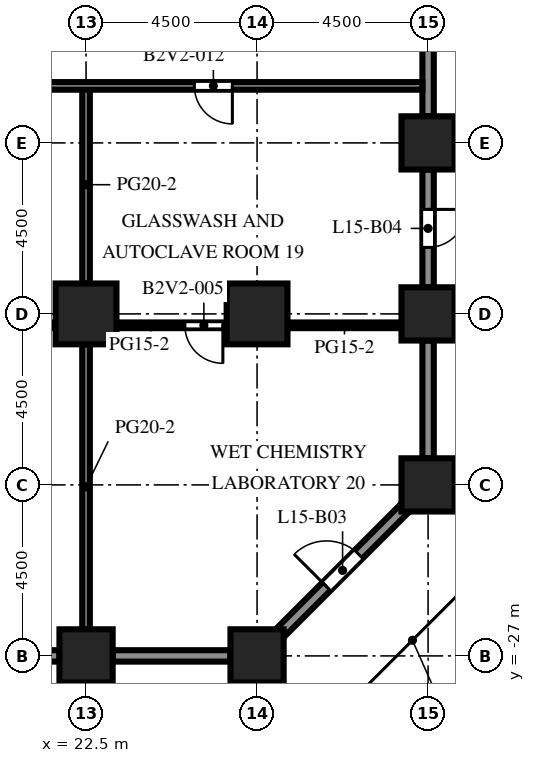
"""IFC4 building model, lengths in metres.
Left out: names, types, materials, properties, quantities, classifications, styles, units other than length and angle.
Written with IfcOpenShell. Run it as: python <this file> out.ifc"""

import sys

from ifc_helpers import new_model, si_unit, direction, frame, frame_2d, origin, origin_2d, place, context, subcontext, project, spatial, rectangle, extrude, element, fill, save


model = new_model("IFC4")
c1 = context("Model", 3, precision=1e-05, world=origin(), true_north=direction((0.0, 1.0)))
c2 = subcontext(c1, "Body", "Model", "MODEL_VIEW")
j1 = project(units=[si_unit("LENGTHUNIT", "METRE"), si_unit("PLANEANGLEUNIT", "RADIAN")], contexts=[c1])
p1 = place(None, origin())
s1 = spatial("IfcSite", under=j1, at=p1, CompositionType="ELEMENT")
p2 = place(p1, origin())
s2 = spatial("IfcBuilding", under=s1, at=p2, CompositionType="ELEMENT")
p3 = place(p2, frame((0.0, 0.0, 66.5)))
s3 = spatial("IfcBuildingStorey", under=s2, at=p3, CompositionType="ELEMENT", Elevation=66.5)
for number, where, z_axis, x_axis in (
    (1, (22.5, -27.0, 0.0), (0.0, 0.0, 1.0), (1.0, 0.0, 0.0)),
    (2, (27.0, -27.0, 0.0), (0.0, 0.0, 1.0), (1.0, 0.0, 0.0)),
    (3, (31.5, -22.5, 0.0), (0.0, 0.0, 1.0), (1.0, 0.0, 0.0)),
    (4, (31.5, -18.0, 0.0), (0.0, 0.0, 1.0), (1.0, 0.0, 0.0)),
    (5, (31.5, -13.5, 0.0), (0.0, 0.0, 1.0), (1.0, 0.0, 0.0)),
):
    element("IfcColumn", number, at=place(p3, frame(where, z_axis=z_axis, x_axis=x_axis)), inside=s3, PredefinedType="COLUMN", context=c2, shape_type="SweptSolid", body=[
        extrude(rectangle(XDim=1.4, YDim=1.4, at=origin_2d()), origin(), (0.0, 0.0, 1.0), 4.1),
    ])
for number, where, z_axis, x_axis in (
    (6, (22.5, -18.0, 0.0), (0.0, 0.0, 1.0), (1.0, 0.0, 0.0)),
    (7, (27.0, -18.0, 0.0), (0.0, 0.0, 1.0), (1.0, 0.0, 0.0)),
):
    element("IfcColumn", number, at=place(p3, frame(where, z_axis=z_axis, x_axis=x_axis)), inside=s3, PredefinedType="COLUMN", context=c2, shape_type="SweptSolid", body=[
        extrude(rectangle(XDim=1.6, YDim=1.6, at=origin_2d()), origin(), (0.0, 0.0, 1.0), 4.1),
    ])
p4 = place(p3, frame((21.8, -27.0, 0.0), z_axis=(0.0, 0.0, 1.0), x_axis=(-1.0, 0.0, 0.0)))
e8 = element("IfcWall", 8, at=p4, inside=s3, PredefinedType="SOLIDWALL", context=c2, shape_type="SweptSolid", body=[
    extrude(rectangle(XDim=3.1, YDim=0.3, at=frame_2d((1.55, 0.0))), origin(), (0.0, 0.0, 1.0), 2.6),
])
p5 = place(p4, frame((1.05, 0.0, 0.0)))
e9 = element("IfcOpeningElement", 9, at=p5, cuts=e8, PredefinedType="OPENING", context=c2, shape_type="SweptSolid", body=[
    extrude(rectangle(XDim=1.0, YDim=2.2, at=frame_2d((0.5, 1.1))), frame((0.0, 0.16, 0.0), z_axis=(0.0, -1.0, 0.0), x_axis=(1.0, 0.0, 0.0)), (0.0, 0.0, 1.0), 0.32),
])
p6 = place(p3, frame((26.3, -27.0, 0.0), z_axis=(0.0, 0.0, 1.0), x_axis=(-1.0, 0.0, 0.0)))
e10 = element("IfcWall", 10, at=p6, inside=s3, PredefinedType="SOLIDWALL", context=c2, shape_type="SweptSolid", body=[
    extrude(rectangle(XDim=3.1, YDim=0.3, at=frame_2d((1.55, 0.0))), origin(), (0.0, 0.0, 1.0), 2.6),
])
p7 = place(p3, frame((30.906, -23.094, 0.0), z_axis=(0.0, 0.0, 1.0), x_axis=(-0.707106781187, -0.707106781187, 0.0)))
e11 = element("IfcWall", 11, at=p7, inside=s3, PredefinedType="SOLIDWALL", context=c2, shape_type="SweptSolid", body=[
    extrude(rectangle(XDim=4.684, YDim=0.3, at=frame_2d((2.342, 0.0))), origin(), (0.0, 0.0, 1.0), 2.6),
])
p8 = place(p7, frame((1.742, 0.0, 0.0)))
e12 = element("IfcOpeningElement", 12, at=p8, cuts=e11, PredefinedType="OPENING", context=c2, shape_type="SweptSolid", body=[
    extrude(rectangle(XDim=1.2, YDim=2.2, at=frame_2d((0.6, 1.1))), frame((0.0, 0.16, 0.0), z_axis=(0.0, -1.0, 0.0), x_axis=(1.0, 0.0, 0.0)), (0.0, 0.0, 1.0), 0.32),
])
p9 = place(p3, frame((31.5, -18.7, 0.0), z_axis=(0.0, 0.0, 1.0), x_axis=(0.0, -1.0, 0.0)))
e13 = element("IfcWall", 13, at=p9, inside=s3, PredefinedType="SOLIDWALL", context=c2, shape_type="SweptSolid", body=[
    extrude(rectangle(XDim=3.1, YDim=0.3, at=frame_2d((1.55, 0.0))), origin(), (0.0, 0.0, 1.0), 2.6),
])
p10 = place(p3, frame((31.5, -14.2, 0.0), z_axis=(0.0, 0.0, 1.0), x_axis=(0.0, -1.0, 0.0)))
e14 = element("IfcWall", 14, at=p10, inside=s3, PredefinedType="SOLIDWALL", context=c2, shape_type="SweptSolid", body=[
    extrude(rectangle(XDim=3.1, YDim=0.3, at=frame_2d((1.55, 0.0))), origin(), (0.0, 0.0, 1.0), 2.6),
])
p11 = place(p10, frame((1.05, 0.0, 0.0)))
e15 = element("IfcOpeningElement", 15, at=p11, cuts=e14, PredefinedType="OPENING", context=c2, shape_type="SweptSolid", body=[
    extrude(rectangle(XDim=1.0, YDim=2.2, at=frame_2d((0.5, 1.1))), frame((0.0, 0.16, 0.0), z_axis=(0.0, -1.0, 0.0), x_axis=(1.0, 0.0, 0.0)), (0.0, 0.0, 1.0), 0.32),
])
p12 = place(p3, frame((31.5, -9.7, 0.0), z_axis=(0.0, 0.0, 1.0), x_axis=(0.0, -1.0, 0.0)))
e16 = element("IfcWall", 16, at=p12, inside=s3, PredefinedType="SOLIDWALL", context=c2, shape_type="SweptSolid", body=[
    extrude(rectangle(XDim=3.1, YDim=0.3, at=frame_2d((1.55, 0.0))), origin(), (0.0, 0.0, 1.0), 2.6),
])
p13 = place(p3, frame((22.5, -26.3, 0.0), z_axis=(0.0, 0.0, 1.0), x_axis=(0.0, 1.0, 0.0)))
e17 = element("IfcWall", 17, at=p13, inside=s3, PredefinedType="PARTITIONING", context=c2, shape_type="SweptSolid", body=[
    extrude(rectangle(XDim=7.5, YDim=0.2, at=frame_2d((3.75, 0.0))), origin(), (0.0, 0.0, 1.0), 3.5),
])
p14 = place(p3, frame((22.5, -17.2, 0.0), z_axis=(0.0, 0.0, 1.0), x_axis=(0.0, 1.0, 0.0)))
e18 = element("IfcWall", 18, at=p14, inside=s3, PredefinedType="PARTITIONING", context=c2, shape_type="SweptSolid", body=[
    extrude(rectangle(XDim=5.2, YDim=0.2, at=frame_2d((2.6, 0.0))), origin(), (0.0, 0.0, 1.0), 3.5),
])
p15 = place(p3, frame((18.8, -18.3, 0.0), z_axis=(0.0, 0.0, 1.0), x_axis=(1.0, 0.0, 0.0)))
e19 = element("IfcWall", 19, at=p15, inside=s3, PredefinedType="PARTITIONING", context=c2, shape_type="SweptSolid", body=[
    extrude(rectangle(XDim=2.9, YDim=0.15, at=frame_2d((1.45, 0.0))), origin(), (0.0, 0.0, 1.0), 3.5),
])
p16 = place(p3, frame((26.2, -18.3, 0.0), z_axis=(0.0, 0.0, 1.0), x_axis=(-1.0, 0.0, 0.0)))
e20 = element("IfcWall", 20, at=p16, inside=s3, PredefinedType="PARTITIONING", context=c2, shape_type="SweptSolid", body=[
    extrude(rectangle(XDim=2.9, YDim=0.15, at=frame_2d((1.45, 0.0))), origin(), (0.0, 0.0, 1.0), 3.5),
])
p17 = place(p16, frame((0.1, 0.0, 0.0)))
e21 = element("IfcOpeningElement", 21, at=p17, cuts=e20, PredefinedType="OPENING", context=c2, shape_type="SweptSolid", body=[
    extrude(rectangle(XDim=1.0, YDim=2.1, at=frame_2d((0.5, 1.05))), frame((0.0, 0.085, 0.0), z_axis=(0.0, -1.0, 0.0), x_axis=(1.0, 0.0, 0.0)), (0.0, 0.0, 1.0), 0.17),
])
p18 = place(p3, frame((27.8, -18.3, 0.0), z_axis=(0.0, 0.0, 1.0), x_axis=(1.0, 0.0, 0.0)))
e22 = element("IfcWall", 22, at=p18, inside=s3, PredefinedType="PARTITIONING", context=c2, shape_type="SweptSolid", body=[
    extrude(rectangle(XDim=3.0, YDim=0.15, at=frame_2d((1.5, 0.0))), origin(), (0.0, 0.0, 1.0), 3.5),
])
p19 = place(p3, frame((31.35, -12.0, 0.0), z_axis=(0.0, 0.0, 1.0), x_axis=(-1.0, 0.0, 0.0)))
e23 = element("IfcWall", 23, at=p19, inside=s3, PredefinedType="PARTITIONING", context=c2, shape_type="SweptSolid", body=[
    extrude(rectangle(XDim=53.7, YDim=0.2, at=frame_2d((26.85, 0.0))), origin(), (0.0, 0.0, 1.0), 3.5),
])
p20 = place(p19, frame((45.25, 0.0, 0.0)))
e24 = element("IfcOpeningElement", 24, at=p20, cuts=e23, PredefinedType="OPENING", context=c2, shape_type="SweptSolid", body=[
    extrude(rectangle(XDim=1.0, YDim=2.1, at=frame_2d((0.5, 1.05))), frame((0.0, 0.11, 0.0), z_axis=(0.0, -1.0, 0.0), x_axis=(1.0, 0.0, 0.0)), (0.0, 0.0, 1.0), 0.22),
])
p21 = place(p19, frame((34.25, 0.0, 0.0)))
e25 = element("IfcOpeningElement", 25, at=p21, cuts=e23, PredefinedType="OPENING", context=c2, shape_type="SweptSolid", body=[
    extrude(rectangle(XDim=1.0, YDim=2.1, at=frame_2d((0.5, 1.05))), frame((0.0, 0.11, 0.0), z_axis=(0.0, -1.0, 0.0), x_axis=(1.0, 0.0, 0.0)), (0.0, 0.0, 1.0), 0.22),
])
p22 = place(p19, frame((25.5, 0.0, 0.0)))
e26 = element("IfcOpeningElement", 26, at=p22, cuts=e23, PredefinedType="OPENING", context=c2, shape_type="SweptSolid", body=[
    extrude(rectangle(XDim=1.0, YDim=2.1, at=frame_2d((0.5, 1.05))), frame((0.0, 0.11, 0.0), z_axis=(0.0, -1.0, 0.0), x_axis=(1.0, 0.0, 0.0)), (0.0, 0.0, 1.0), 0.22),
])
p23 = place(p19, frame((15.0, 0.0, 0.0)))
e27 = element("IfcOpeningElement", 27, at=p23, cuts=e23, PredefinedType="OPENING", context=c2, shape_type="SweptSolid", body=[
    extrude(rectangle(XDim=1.0, YDim=2.1, at=frame_2d((0.5, 1.05))), frame((0.0, 0.11, 0.0), z_axis=(0.0, -1.0, 0.0), x_axis=(1.0, 0.0, 0.0)), (0.0, 0.0, 1.0), 0.22),
])
p24 = place(p19, frame((5.0, 0.0, 0.0)))
e28 = element("IfcOpeningElement", 28, at=p24, cuts=e23, PredefinedType="OPENING", context=c2, shape_type="SweptSolid", body=[
    extrude(rectangle(XDim=1.0, YDim=2.1, at=frame_2d((0.5, 1.05))), frame((0.0, 0.11, 0.0), z_axis=(0.0, -1.0, 0.0), x_axis=(1.0, 0.0, 0.0)), (0.0, 0.0, 1.0), 0.22),
])
p25 = place(p8, origin())
e29 = element("IfcDoor", 29, at=p25, inside=s3, OperationType="SINGLE_SWING_RIGHT", PredefinedType="DOOR", context=c2, shape_type="SweptSolid", body=[
    extrude(rectangle(XDim=1.2, YDim=2.2, at=frame_2d((0.6, 1.1))), frame((0.0, 0.025, 0.0), z_axis=(0.0, -1.0, 0.0), x_axis=(1.0, 0.0, 0.0)), (0.0, 0.0, 1.0), 0.05),
])
fill(e12, e29)
p26 = place(p11, origin())
e30 = element("IfcDoor", 30, at=p26, inside=s3, OperationType="SINGLE_SWING_LEFT", PredefinedType="DOOR", context=c2, shape_type="SweptSolid", body=[
    extrude(rectangle(XDim=1.0, YDim=2.2, at=frame_2d((0.5, 1.1))), frame((0.0, 0.025, 0.0), z_axis=(0.0, -1.0, 0.0), x_axis=(1.0, 0.0, 0.0)), (0.0, 0.0, 1.0), 0.05),
])
fill(e15, e30)
p27 = place(p17, origin())
e31 = element("IfcDoor", 31, at=p27, inside=s3, OperationType="SINGLE_SWING_LEFT", PredefinedType="DOOR", context=c2, shape_type="SweptSolid", body=[
    extrude(rectangle(XDim=1.0, YDim=2.1, at=frame_2d((0.5, 1.05))), frame((0.0, 0.025, 0.0), z_axis=(0.0, -1.0, 0.0), x_axis=(1.0, 0.0, 0.0)), (0.0, 0.0, 1.0), 0.05),
])
fill(e21, e31)
p28 = place(p24, origin())
e32 = element("IfcDoor", 32, at=p28, inside=s3, OperationType="SINGLE_SWING_LEFT", PredefinedType="DOOR", context=c2, shape_type="SweptSolid", body=[
    extrude(rectangle(XDim=1.0, YDim=2.1, at=frame_2d((0.5, 1.05))), frame((0.0, 0.025, 0.0), z_axis=(0.0, -1.0, 0.0), x_axis=(1.0, 0.0, 0.0)), (0.0, 0.0, 1.0), 0.05),
])
fill(e28, e32)
save(model, sys.argv[1])
